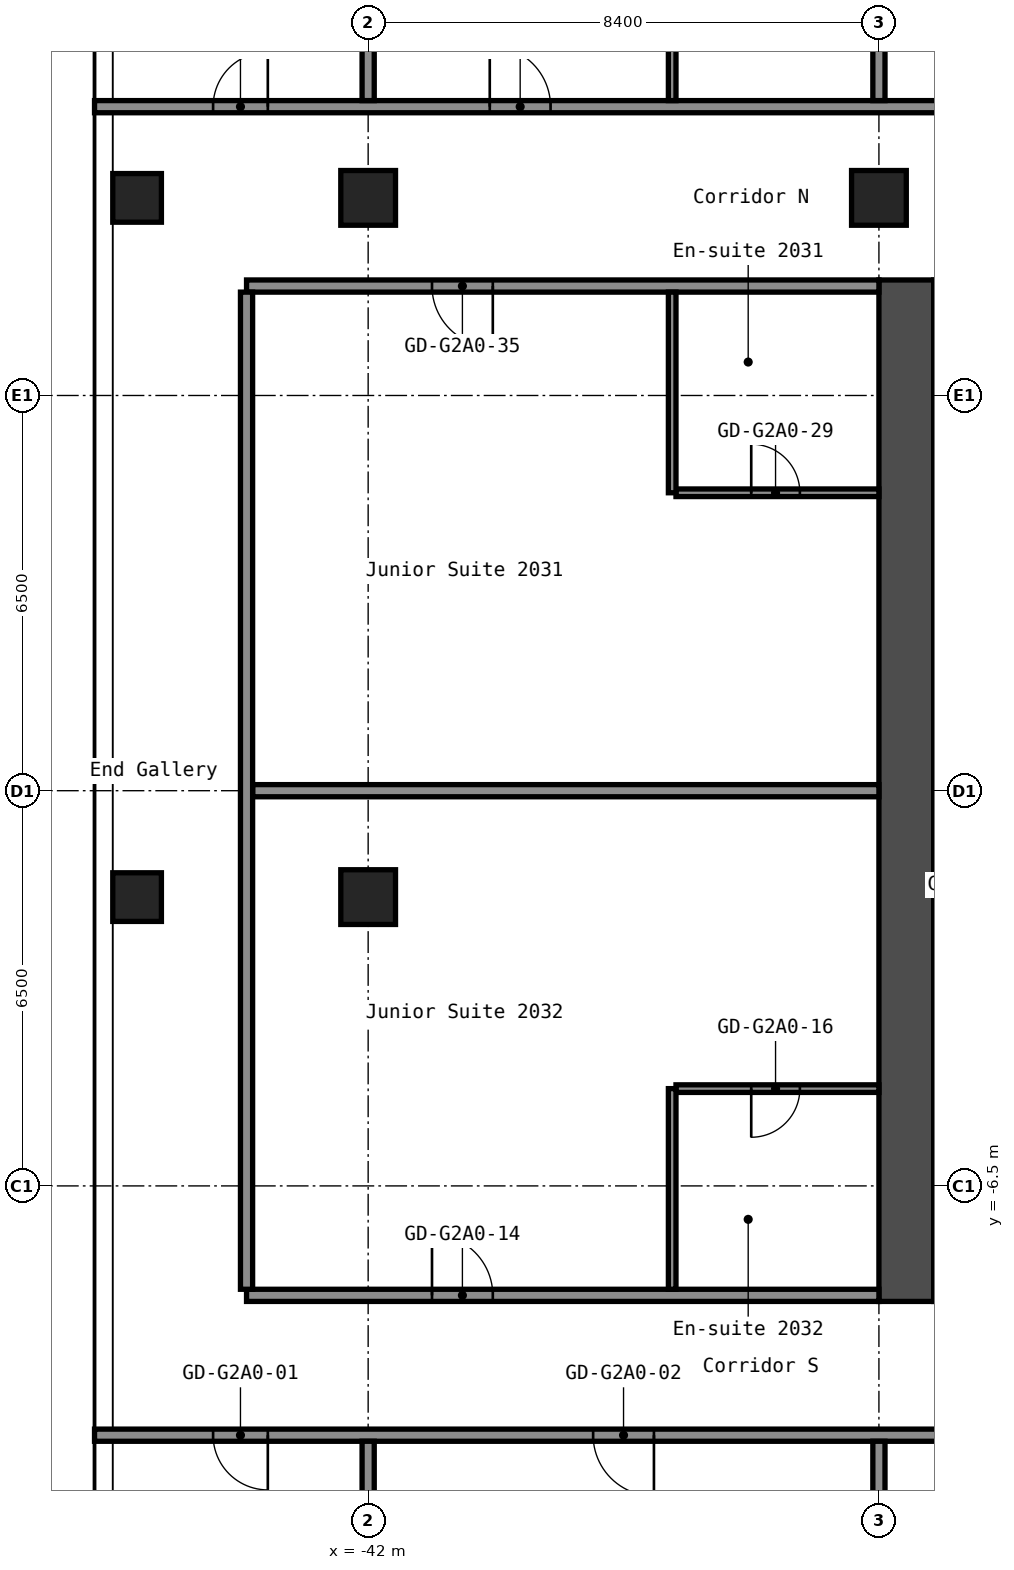
"""IFC4 building model, lengths in metres.
Left out: names, types, materials, properties, quantities, classifications, styles, units other than length and angle.
Written with IfcOpenShell. Run it as: python <this file> out.ifc"""

import sys

from ifc_helpers import new_model, si_unit, direction, frame, frame_2d, origin, origin_2d, place, context, subcontext, project, spatial, rectangle, hollow_rectangle, extrude, element, fill, save


model = new_model("IFC4")
c1 = context("Model", 3, precision=1e-05, world=origin(), true_north=direction((0.0, 1.0)))
c2 = subcontext(c1, "Body", "Model", "MODEL_VIEW")
j1 = project(units=[si_unit("LENGTHUNIT", "METRE"), si_unit("PLANEANGLEUNIT", "RADIAN")], contexts=[c1])
p1 = place(None, origin())
s1 = spatial("IfcSite", under=j1, at=p1, CompositionType="ELEMENT")
p2 = place(p1, origin())
s2 = spatial("IfcBuilding", under=s1, at=p2, CompositionType="ELEMENT")
p3 = place(p2, frame((0.0, 0.0, 75.4)))
s3 = spatial("IfcBuildingStorey", under=s2, at=p3, CompositionType="ELEMENT", Elevation=75.4)
for number, where, z_axis, x_axis in (
    (1, (-45.8, -1.75, 0.0), (0.0, 0.0, 1.0), (1.0, 0.0, 0.0)),
    (2, (-45.8, 9.75, 0.0), (0.0, 0.0, 1.0), (1.0, 0.0, 0.0)),
):
    element("IfcColumn", number, at=place(p3, frame(where, z_axis=z_axis, x_axis=x_axis)), inside=s3, PredefinedType="COLUMN", context=c2, shape_type="SweptSolid", body=[
        extrude(hollow_rectangle(XDim=0.8, YDim=0.8, WallThickness=0.032, at=origin_2d()), origin(), (0.0, 0.0, 1.0), 2.8),
    ])
for number, where, z_axis, x_axis in (
    (3, (-42.0, -1.75, 0.0), (0.0, 0.0, 1.0), (1.0, 0.0, 0.0)),
    (4, (-42.0, 9.75, 0.0), (0.0, 0.0, 1.0), (1.0, 0.0, 0.0)),
    (5, (-33.6, 9.75, 0.0), (0.0, 0.0, 1.0), (1.0, 0.0, 0.0)),
):
    element("IfcColumn", number, at=place(p3, frame(where, z_axis=z_axis, x_axis=x_axis)), inside=s3, PredefinedType="COLUMN", context=c2, shape_type="SweptSolid", body=[
        extrude(hollow_rectangle(XDim=0.9, YDim=0.9, WallThickness=0.036, at=origin_2d()), origin(), (0.0, 0.0, 1.0), 2.8),
    ])
p4 = place(p3, frame((-33.15, -8.4, 0.0), z_axis=(0.0, 0.0, 1.0), x_axis=(0.0, 1.0, 0.0)))
e6 = element("IfcWall", 6, at=p4, inside=s3, PredefinedType="SHEAR", context=c2, shape_type="SweptSolid", body=[
    extrude(rectangle(XDim=16.8, YDim=0.9, at=frame_2d((8.4, 0.0))), origin(), (0.0, 0.0, 1.0), 2.8),
])
p5 = place(p3, frame((-32.7, 1.325, 0.0), z_axis=(0.0, 0.0, 1.0), x_axis=(1.0, 0.0, 0.0)))
e7 = element("IfcWall", 7, at=p5, inside=s3, PredefinedType="SHEAR", context=c2, shape_type="SweptSolid", body=[
    extrude(rectangle(XDim=5.05, YDim=0.25, at=frame_2d((2.525, 0.0))), origin(), (0.0, 0.0, 1.0), 2.8),
])
p6 = place(p5, frame((3.3, 0.0, 0.0)))
e8 = element("IfcOpeningElement", 8, at=p6, cuts=e7, PredefinedType="OPENING", context=c2, shape_type="SweptSolid", body=[
    extrude(rectangle(XDim=1.2, YDim=2.1, at=frame_2d((0.6, 1.05))), frame((0.0, 0.135, 0.0), z_axis=(0.0, -1.0, 0.0), x_axis=(1.0, 0.0, 0.0)), (0.0, 0.0, 1.0), 0.27),
])
p7 = place(p3, frame((-32.7, -3.625, 0.0), z_axis=(0.0, 0.0, 1.0), x_axis=(1.0, 0.0, 0.0)))
e9 = element("IfcWall", 9, at=p7, inside=s3, PredefinedType="SHEAR", context=c2, shape_type="SweptSolid", body=[
    extrude(rectangle(XDim=4.55, YDim=0.25, at=frame_2d((2.275, 0.0))), origin(), (0.0, 0.0, 1.0), 2.8),
])
p8 = place(p7, frame((2.85, 0.0, 0.0)))
e10 = element("IfcOpeningElement", 10, at=p8, cuts=e9, PredefinedType="OPENING", context=c2, shape_type="SweptSolid", body=[
    extrude(rectangle(XDim=1.1, YDim=2.1, at=frame_2d((0.55, 1.05))), frame((0.0, 0.135, 0.0), z_axis=(0.0, -1.0, 0.0), x_axis=(1.0, 0.0, 0.0)), (0.0, 0.0, 1.0), 0.27),
])
p9 = place(p7, frame((0.6, 0.0, 0.0)))
e11 = element("IfcOpeningElement", 11, at=p9, cuts=e9, PredefinedType="OPENING", context=c2, shape_type="SweptSolid", body=[
    extrude(rectangle(XDim=1.1, YDim=2.1, at=frame_2d((0.55, 1.05))), frame((0.0, 0.135, 0.0), z_axis=(0.0, -1.0, 0.0), x_axis=(1.0, 0.0, 0.0)), (0.0, 0.0, 1.0), 0.27),
])
p10 = place(p3, frame((-32.7, -6.75, 0.0), z_axis=(0.0, 0.0, 1.0), x_axis=(1.0, 0.0, 0.0)))
e12 = element("IfcWall", 12, at=p10, inside=s3, PredefinedType="SHEAR", context=c2, shape_type="SweptSolid", body=[
    extrude(rectangle(XDim=4.55, YDim=1.5, at=frame_2d((2.275, 0.0))), origin(), (0.0, 0.0, 1.0), 2.8),
])
p11 = place(p3, frame((-46.5, -10.6, 0.0), z_axis=(0.0, 0.0, 1.0), x_axis=(1.0, 0.0, 0.0)))
e13 = element("IfcWall", 13, at=p11, inside=s3, PredefinedType="PARTITIONING", context=c2, shape_type="SweptSolid", body=[
    extrude(rectangle(XDim=29.7, YDim=0.2, at=frame_2d((14.85, 0.0))), origin(), (0.0, 0.0, 1.0), 2.8),
])
p12 = place(p11, frame((1.95, 0.0, 0.0)))
e14 = element("IfcOpeningElement", 14, at=p12, cuts=e13, PredefinedType="OPENING", context=c2, shape_type="SweptSolid", body=[
    extrude(rectangle(XDim=0.9, YDim=2.1, at=frame_2d((0.45, 1.05))), frame((0.0, 0.11, 0.0), z_axis=(0.0, -1.0, 0.0), x_axis=(1.0, 0.0, 0.0)), (0.0, 0.0, 1.0), 0.22),
])
p13 = place(p11, frame((8.2, 0.0, 0.0)))
e15 = element("IfcOpeningElement", 15, at=p13, cuts=e13, PredefinedType="OPENING", context=c2, shape_type="SweptSolid", body=[
    extrude(rectangle(XDim=1.0, YDim=2.1, at=frame_2d((0.5, 1.05))), frame((0.0, 0.11, 0.0), z_axis=(0.0, -1.0, 0.0), x_axis=(1.0, 0.0, 0.0)), (0.0, 0.0, 1.0), 0.22),
])
p14 = place(p11, frame((14.8, 0.0, 0.0)))
e16 = element("IfcOpeningElement", 16, at=p14, cuts=e13, PredefinedType="OPENING", context=c2, shape_type="SweptSolid", body=[
    extrude(rectangle(XDim=0.9, YDim=2.1, at=frame_2d((0.45, 1.05))), frame((0.0, 0.11, 0.0), z_axis=(0.0, -1.0, 0.0), x_axis=(1.0, 0.0, 0.0)), (0.0, 0.0, 1.0), 0.22),
])
p15 = place(p11, frame((19.0, 0.0, 0.0)))
e17 = element("IfcOpeningElement", 17, at=p15, cuts=e13, PredefinedType="OPENING", context=c2, shape_type="SweptSolid", body=[
    extrude(rectangle(XDim=0.9, YDim=2.1, at=frame_2d((0.45, 1.05))), frame((0.0, 0.11, 0.0), z_axis=(0.0, -1.0, 0.0), x_axis=(1.0, 0.0, 0.0)), (0.0, 0.0, 1.0), 0.22),
])
p16 = place(p11, frame((22.555, 0.0, 0.0)))
e18 = element("IfcOpeningElement", 18, at=p16, cuts=e13, PredefinedType="OPENING", context=c2, shape_type="SweptSolid", body=[
    extrude(rectangle(XDim=0.9, YDim=2.1, at=frame_2d((0.45, 1.05))), frame((0.0, 0.11, 0.0), z_axis=(0.0, -1.0, 0.0), x_axis=(1.0, 0.0, 0.0)), (0.0, 0.0, 1.0), 0.22),
])
p17 = place(p11, frame((26.755, 0.0, 0.0)))
e19 = element("IfcOpeningElement", 19, at=p17, cuts=e13, PredefinedType="OPENING", context=c2, shape_type="SweptSolid", body=[
    extrude(rectangle(XDim=0.9, YDim=2.1, at=frame_2d((0.45, 1.05))), frame((0.0, 0.11, 0.0), z_axis=(0.0, -1.0, 0.0), x_axis=(1.0, 0.0, 0.0)), (0.0, 0.0, 1.0), 0.22),
])
p18 = place(p3, frame((-44.0, -8.3, 0.0), z_axis=(0.0, 0.0, 1.0), x_axis=(1.0, 0.0, 0.0)))
e20 = element("IfcWall", 20, at=p18, inside=s3, PredefinedType="PARTITIONING", context=c2, shape_type="SweptSolid", body=[
    extrude(rectangle(XDim=10.4, YDim=0.2, at=frame_2d((5.2, 0.0))), origin(), (0.0, 0.0, 1.0), 2.8),
])
p19 = place(p18, frame((3.05, 0.0, 0.0)))
e21 = element("IfcOpeningElement", 21, at=p19, cuts=e20, PredefinedType="OPENING", context=c2, shape_type="SweptSolid", body=[
    extrude(rectangle(XDim=1.0, YDim=2.1, at=frame_2d((0.5, 1.05))), frame((0.0, 0.11, 0.0), z_axis=(0.0, -1.0, 0.0), x_axis=(1.0, 0.0, 0.0)), (0.0, 0.0, 1.0), 0.22),
])
p20 = place(p3, frame((-36.938, -4.9, 0.0), z_axis=(0.0, 0.0, 1.0), x_axis=(1.0, 0.0, 0.0)))
e22 = element("IfcWall", 22, at=p20, inside=s3, PredefinedType="PARTITIONING", context=c2, shape_type="SweptSolid", body=[
    extrude(rectangle(XDim=3.337, YDim=0.125, at=frame_2d((1.669, 0.0))), origin(), (0.0, 0.0, 1.0), 2.8),
])
p21 = place(p20, frame((1.238, 0.0, 0.0)))
e23 = element("IfcOpeningElement", 23, at=p21, cuts=e22, PredefinedType="OPENING", context=c2, shape_type="SweptSolid", body=[
    extrude(rectangle(XDim=0.8, YDim=2.1, at=frame_2d((0.4, 1.05))), frame((0.0, 0.073, 0.0), z_axis=(0.0, -1.0, 0.0), x_axis=(1.0, 0.0, 0.0)), (0.0, 0.0, 1.0), 0.145),
])
p22 = place(p3, frame((-43.9, 0.0, 0.0), z_axis=(0.0, 0.0, 1.0), x_axis=(1.0, 0.0, 0.0)))
e24 = element("IfcWall", 24, at=p22, inside=s3, PredefinedType="PARTITIONING", context=c2, shape_type="SweptSolid", body=[
    extrude(rectangle(XDim=10.3, YDim=0.2, at=frame_2d((5.15, 0.0))), origin(), (0.0, 0.0, 1.0), 2.8),
])
p23 = place(p3, frame((-36.938, 4.9, 0.0), z_axis=(0.0, 0.0, 1.0), x_axis=(1.0, 0.0, 0.0)))
e25 = element("IfcWall", 25, at=p23, inside=s3, PredefinedType="PARTITIONING", context=c2, shape_type="SweptSolid", body=[
    extrude(rectangle(XDim=3.337, YDim=0.125, at=frame_2d((1.669, 0.0))), origin(), (0.0, 0.0, 1.0), 2.8),
])
p24 = place(p23, frame((1.238, 0.0, 0.0)))
e26 = element("IfcOpeningElement", 26, at=p24, cuts=e25, PredefinedType="OPENING", context=c2, shape_type="SweptSolid", body=[
    extrude(rectangle(XDim=0.8, YDim=2.1, at=frame_2d((0.4, 1.05))), frame((0.0, 0.073, 0.0), z_axis=(0.0, -1.0, 0.0), x_axis=(1.0, 0.0, 0.0)), (0.0, 0.0, 1.0), 0.145),
])
p25 = place(p3, frame((-44.0, 8.3, 0.0), z_axis=(0.0, 0.0, 1.0), x_axis=(1.0, 0.0, 0.0)))
e27 = element("IfcWall", 27, at=p25, inside=s3, PredefinedType="PARTITIONING", context=c2, shape_type="SweptSolid", body=[
    extrude(rectangle(XDim=10.4, YDim=0.2, at=frame_2d((5.2, 0.0))), origin(), (0.0, 0.0, 1.0), 2.8),
])
p26 = place(p25, frame((3.05, 0.0, 0.0)))
e28 = element("IfcOpeningElement", 28, at=p26, cuts=e27, PredefinedType="OPENING", context=c2, shape_type="SweptSolid", body=[
    extrude(rectangle(XDim=1.0, YDim=2.1, at=frame_2d((0.5, 1.05))), frame((0.0, 0.11, 0.0), z_axis=(0.0, -1.0, 0.0), x_axis=(1.0, 0.0, 0.0)), (0.0, 0.0, 1.0), 0.22),
])
p27 = place(p3, frame((-46.5, 11.25, 0.0), z_axis=(0.0, 0.0, 1.0), x_axis=(1.0, 0.0, 0.0)))
e29 = element("IfcWall", 29, at=p27, inside=s3, PredefinedType="PARTITIONING", context=c2, shape_type="SweptSolid", body=[
    extrude(rectangle(XDim=29.7, YDim=0.2, at=frame_2d((14.85, 0.0))), origin(), (0.0, 0.0, 1.0), 2.8),
])
p28 = place(p27, frame((1.95, 0.0, 0.0)))
e30 = element("IfcOpeningElement", 30, at=p28, cuts=e29, PredefinedType="OPENING", context=c2, shape_type="SweptSolid", body=[
    extrude(rectangle(XDim=0.9, YDim=2.1, at=frame_2d((0.45, 1.05))), frame((0.0, 0.11, 0.0), z_axis=(0.0, -1.0, 0.0), x_axis=(1.0, 0.0, 0.0)), (0.0, 0.0, 1.0), 0.22),
])
p29 = place(p27, frame((6.5, 0.0, 0.0)))
e31 = element("IfcOpeningElement", 31, at=p29, cuts=e29, PredefinedType="OPENING", context=c2, shape_type="SweptSolid", body=[
    extrude(rectangle(XDim=1.0, YDim=2.1, at=frame_2d((0.5, 1.05))), frame((0.0, 0.11, 0.0), z_axis=(0.0, -1.0, 0.0), x_axis=(1.0, 0.0, 0.0)), (0.0, 0.0, 1.0), 0.22),
])
p30 = place(p27, frame((18.3, 0.0, 0.0)))
e32 = element("IfcOpeningElement", 32, at=p30, cuts=e29, PredefinedType="OPENING", context=c2, shape_type="SweptSolid", body=[
    extrude(rectangle(XDim=1.0, YDim=2.1, at=frame_2d((0.5, 1.05))), frame((0.0, 0.11, 0.0), z_axis=(0.0, -1.0, 0.0), x_axis=(1.0, 0.0, 0.0)), (0.0, 0.0, 1.0), 0.22),
])
p31 = place(p27, frame((23.3, 0.0, 0.0)))
e33 = element("IfcOpeningElement", 33, at=p31, cuts=e29, PredefinedType="OPENING", context=c2, shape_type="SweptSolid", body=[
    extrude(rectangle(XDim=1.0, YDim=2.1, at=frame_2d((0.5, 1.05))), frame((0.0, 0.11, 0.0), z_axis=(0.0, -1.0, 0.0), x_axis=(1.0, 0.0, 0.0)), (0.0, 0.0, 1.0), 0.22),
])
p32 = place(p3, frame((-44.0, -8.2, 0.0), z_axis=(0.0, 0.0, 1.0), x_axis=(0.0, 1.0, 0.0)))
e34 = element("IfcWall", 34, at=p32, inside=s3, PredefinedType="PARTITIONING", context=c2, shape_type="SweptSolid", body=[
    extrude(rectangle(XDim=16.4, YDim=0.2, at=frame_2d((8.2, 0.0))), origin(), (0.0, 0.0, 1.0), 2.8),
])
p33 = place(p3, frame((-42.0, -15.55, 0.0), z_axis=(0.0, 0.0, 1.0), x_axis=(0.0, 1.0, 0.0)))
e35 = element("IfcWall", 35, at=p33, inside=s3, PredefinedType="PARTITIONING", context=c2, shape_type="SweptSolid", body=[
    extrude(rectangle(XDim=4.85, YDim=0.2, at=frame_2d((2.425, 0.0))), origin(), (0.0, 0.0, 1.0), 2.8),
])
p34 = place(p3, frame((-42.0, 11.35, 0.0), z_axis=(0.0, 0.0, 1.0), x_axis=(0.0, 1.0, 0.0)))
e36 = element("IfcWall", 36, at=p34, inside=s3, PredefinedType="PARTITIONING", context=c2, shape_type="SweptSolid", body=[
    extrude(rectangle(XDim=12.2, YDim=0.2, at=frame_2d((6.1, 0.0))), origin(), (0.0, 0.0, 1.0), 2.8),
])
for number, where, z_axis, x_axis in (
    (37, (-37.0, -8.2, 0.0), (0.0, 0.0, 1.0), (0.0, 1.0, 0.0)),
    (38, (-37.0, 4.9, 0.0), (0.0, 0.0, 1.0), (0.0, 1.0, 0.0)),
):
    element("IfcWall", number, at=place(p3, frame(where, z_axis=z_axis, x_axis=x_axis)), inside=s3, PredefinedType="PARTITIONING", context=c2, shape_type="SweptSolid", body=[
        extrude(rectangle(XDim=3.3, YDim=0.125, at=frame_2d((1.65, 0.0))), origin(), (0.0, 0.0, 1.0), 2.8),
    ])
p35 = place(p3, frame((-37.0, 11.35, 0.0), z_axis=(0.0, 0.0, 1.0), x_axis=(0.0, 1.0, 0.0)))
e39 = element("IfcWall", 39, at=p35, inside=s3, PredefinedType="PARTITIONING", context=c2, shape_type="SweptSolid", body=[
    extrude(rectangle(XDim=3.3, YDim=0.125, at=frame_2d((1.65, 0.0))), origin(), (0.0, 0.0, 1.0), 2.8),
])
p36 = place(p3, frame((-33.6, -15.55, 0.0), z_axis=(0.0, 0.0, 1.0), x_axis=(0.0, 1.0, 0.0)))
e40 = element("IfcWall", 40, at=p36, inside=s3, PredefinedType="PARTITIONING", context=c2, shape_type="SweptSolid", body=[
    extrude(rectangle(XDim=4.85, YDim=0.2, at=frame_2d((2.425, 0.0))), origin(), (0.0, 0.0, 1.0), 2.8),
])
p37 = place(p3, frame((-33.6, 11.35, 0.0), z_axis=(0.0, 0.0, 1.0), x_axis=(0.0, 1.0, 0.0)))
e41 = element("IfcWall", 41, at=p37, inside=s3, PredefinedType="PARTITIONING", context=c2, shape_type="SweptSolid", body=[
    extrude(rectangle(XDim=12.2, YDim=0.2, at=frame_2d((6.1, 0.0))), origin(), (0.0, 0.0, 1.0), 2.8),
])
p38 = place(p12, origin())
e42 = element("IfcDoor", 42, at=p38, inside=s3, OperationType="SINGLE_SWING_RIGHT", PredefinedType="DOOR", context=c2, shape_type="SweptSolid", body=[
    extrude(rectangle(XDim=0.9, YDim=2.1, at=frame_2d((0.45, 1.05))), frame((0.0, 0.025, 0.0), z_axis=(0.0, -1.0, 0.0), x_axis=(1.0, 0.0, 0.0)), (0.0, 0.0, 1.0), 0.05),
])
fill(e14, e42)
p39 = place(p13, origin())
e43 = element("IfcDoor", 43, at=p39, inside=s3, OperationType="SINGLE_SWING_RIGHT", PredefinedType="DOOR", context=c2, shape_type="SweptSolid", body=[
    extrude(rectangle(XDim=1.0, YDim=2.1, at=frame_2d((0.5, 1.05))), frame((0.0, 0.025, 0.0), z_axis=(0.0, -1.0, 0.0), x_axis=(1.0, 0.0, 0.0)), (0.0, 0.0, 1.0), 0.05),
])
fill(e15, e43)
p40 = place(p19, origin())
e44 = element("IfcDoor", 44, at=p40, inside=s3, OperationType="SINGLE_SWING_RIGHT", PredefinedType="DOOR", context=c2, shape_type="SweptSolid", body=[
    extrude(rectangle(XDim=1.0, YDim=2.1, at=frame_2d((0.5, 1.05))), frame((0.0, 0.025, 0.0), z_axis=(0.0, -1.0, 0.0), x_axis=(1.0, 0.0, 0.0)), (0.0, 0.0, 1.0), 0.05),
])
fill(e21, e44)
p41 = place(p21, origin())
e45 = element("IfcDoor", 45, at=p41, inside=s3, OperationType="SINGLE_SWING_LEFT", PredefinedType="DOOR", context=c2, shape_type="SweptSolid", body=[
    extrude(rectangle(XDim=0.8, YDim=2.1, at=frame_2d((0.4, 1.05))), frame((0.0, 0.025, 0.0), z_axis=(0.0, -1.0, 0.0), x_axis=(1.0, 0.0, 0.0)), (0.0, 0.0, 1.0), 0.05),
])
fill(e23, e45)
p42 = place(p24, origin())
e46 = element("IfcDoor", 46, at=p42, inside=s3, OperationType="SINGLE_SWING_RIGHT", PredefinedType="DOOR", context=c2, shape_type="SweptSolid", body=[
    extrude(rectangle(XDim=0.8, YDim=2.1, at=frame_2d((0.4, 1.05))), frame((0.0, 0.025, 0.0), z_axis=(0.0, -1.0, 0.0), x_axis=(1.0, 0.0, 0.0)), (0.0, 0.0, 1.0), 0.05),
])
fill(e26, e46)
p43 = place(p26, origin())
e47 = element("IfcDoor", 47, at=p43, inside=s3, OperationType="SINGLE_SWING_RIGHT", PredefinedType="DOOR", context=c2, shape_type="SweptSolid", body=[
    extrude(rectangle(XDim=1.0, YDim=2.1, at=frame_2d((0.5, 1.05))), frame((0.0, 0.025, 0.0), z_axis=(0.0, -1.0, 0.0), x_axis=(1.0, 0.0, 0.0)), (0.0, 0.0, 1.0), 0.05),
])
fill(e28, e47)
p44 = place(p28, origin())
e48 = element("IfcDoor", 48, at=p44, inside=s3, OperationType="SINGLE_SWING_LEFT", PredefinedType="DOOR", context=c2, shape_type="SweptSolid", body=[
    extrude(rectangle(XDim=0.9, YDim=2.1, at=frame_2d((0.45, 1.05))), frame((0.0, 0.025, 0.0), z_axis=(0.0, -1.0, 0.0), x_axis=(1.0, 0.0, 0.0)), (0.0, 0.0, 1.0), 0.05),
])
fill(e30, e48)
p45 = place(p29, origin())
e49 = element("IfcDoor", 49, at=p45, inside=s3, OperationType="SINGLE_SWING_RIGHT", PredefinedType="DOOR", context=c2, shape_type="SweptSolid", body=[
    extrude(rectangle(XDim=1.0, YDim=2.1, at=frame_2d((0.5, 1.05))), frame((0.0, 0.025, 0.0), z_axis=(0.0, -1.0, 0.0), x_axis=(1.0, 0.0, 0.0)), (0.0, 0.0, 1.0), 0.05),
])
fill(e31, e49)
save(model, sys.argv[1])
